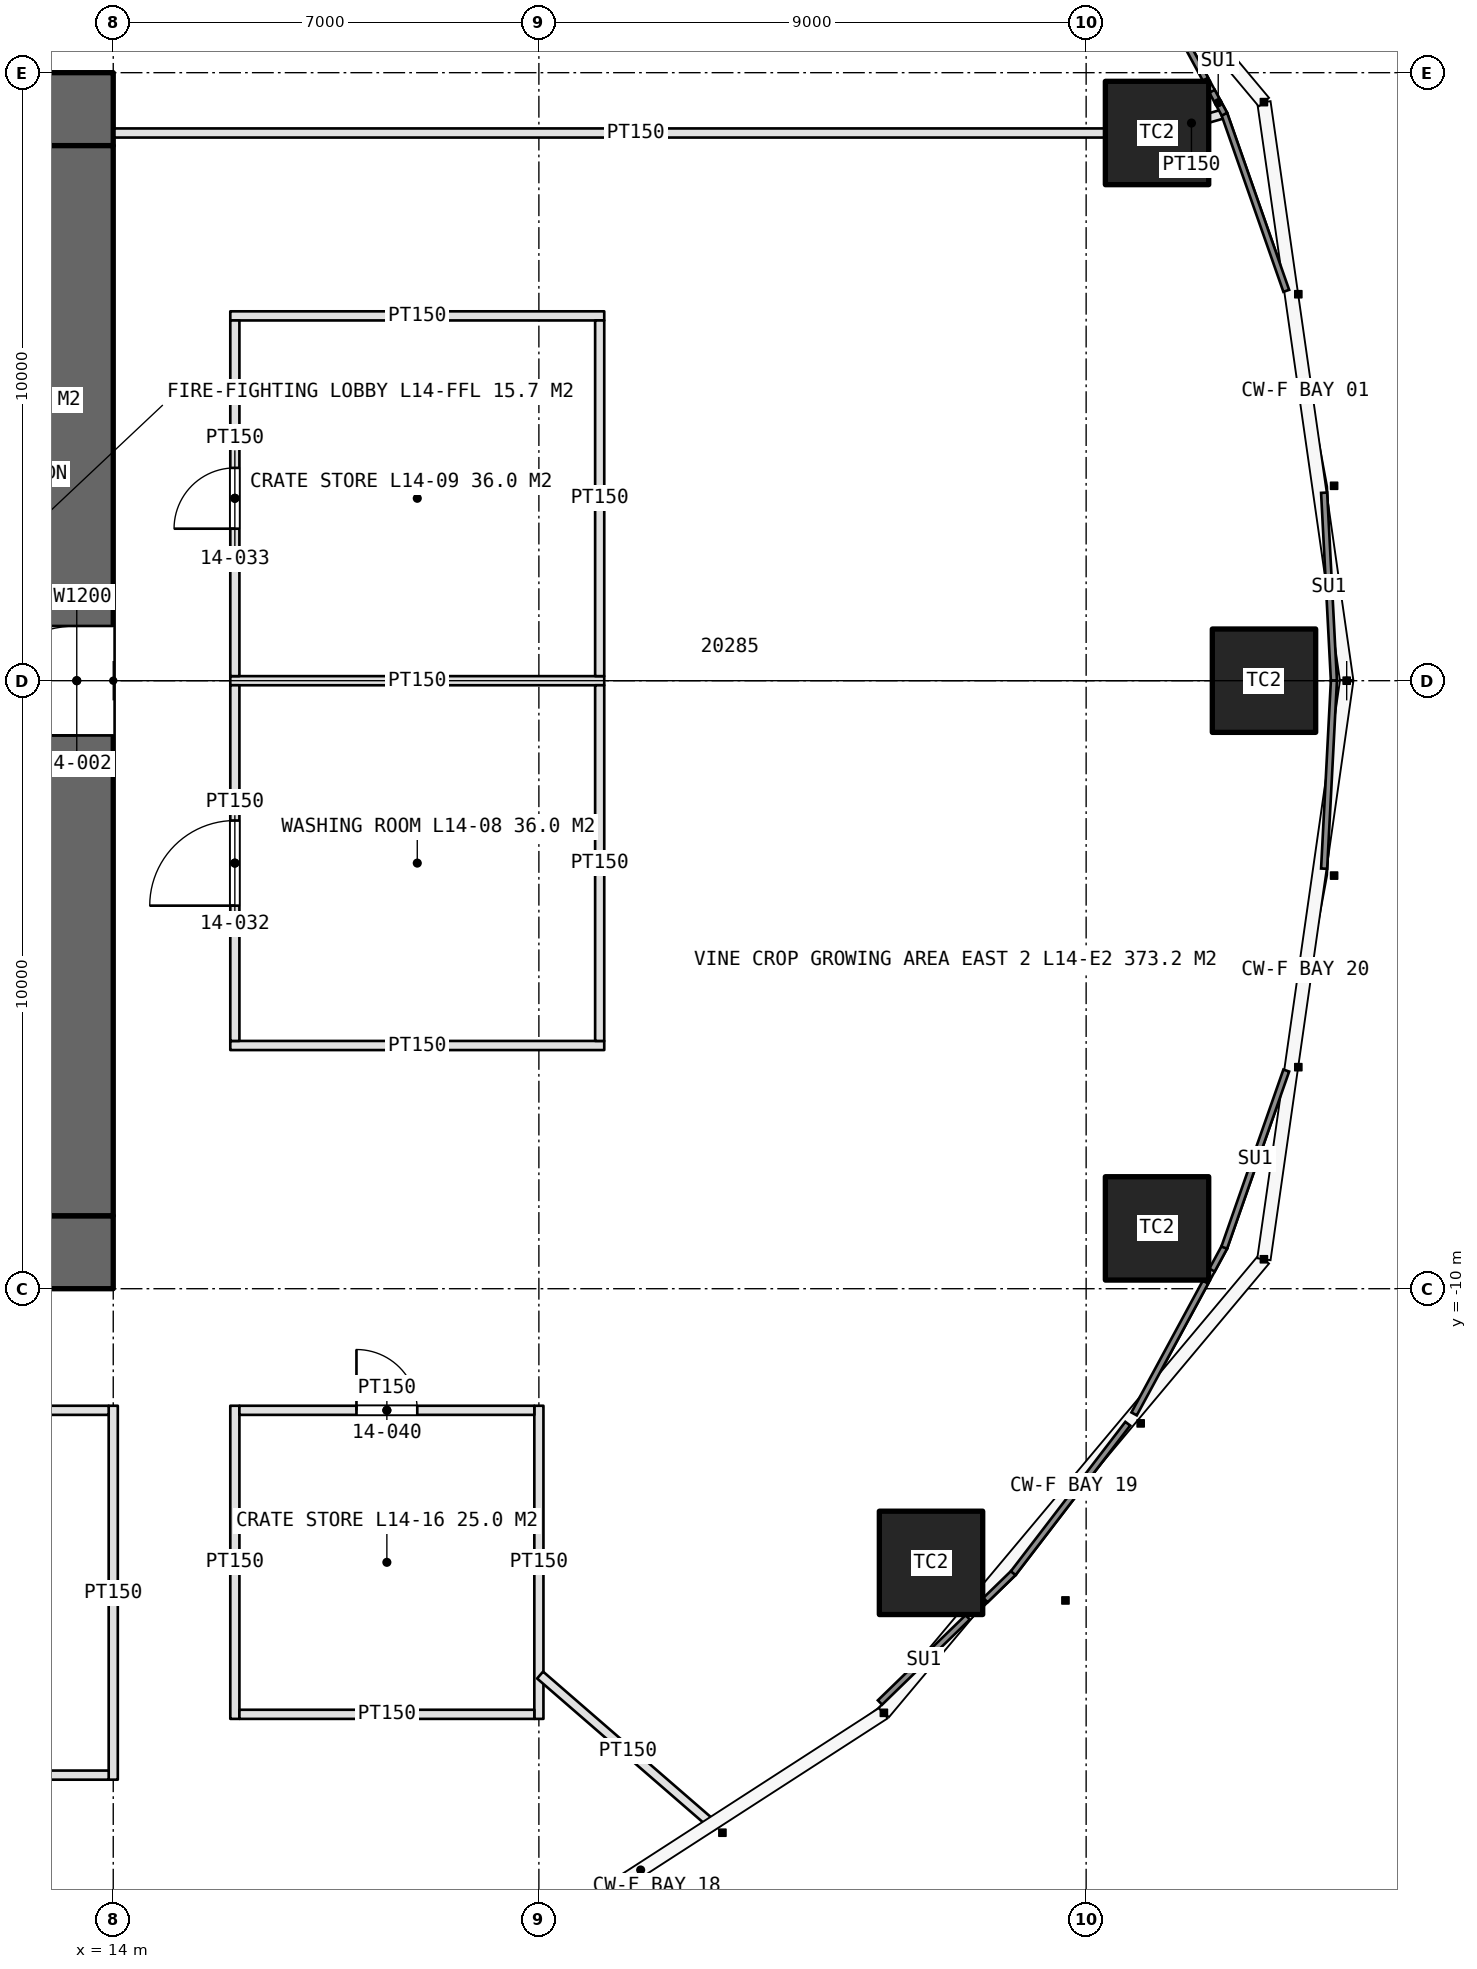
"""IFC4 building model, lengths in metres.
Left out: names, types, materials, properties, quantities, classifications, styles, units other than length and angle.
Written with IfcOpenShell. Run it as: python <this file> out.ifc"""

import sys

from ifc_helpers import new_model, si_unit, direction, frame, frame_2d, origin, origin_2d, place, context, subcontext, project, spatial, rectangle, extrude, element, fill, save


model = new_model("IFC4")
c1 = context("Model", 3, precision=1e-05, world=origin(), true_north=direction((0.0, 1.0)))
c2 = subcontext(c1, "Body", "Model", "MODEL_VIEW")
j1 = project(units=[si_unit("LENGTHUNIT", "METRE"), si_unit("PLANEANGLEUNIT", "RADIAN")], contexts=[c1])
p1 = place(None, origin())
s1 = spatial("IfcSite", under=j1, at=p1, CompositionType="ELEMENT")
p2 = place(p1, origin())
s2 = spatial("IfcBuilding", under=s1, at=p2, CompositionType="ELEMENT")
p3 = place(p2, frame((0.0, 0.0, 70.0)))
s3 = spatial("IfcBuildingStorey", under=s2, at=p3, CompositionType="ELEMENT", Elevation=70.0)
p4 = place(p3, frame((-14.0, -9.4, 0.0), z_axis=(0.0, 0.0, 1.0), x_axis=(1.0, 0.0, 0.0)))
e1 = element("IfcWall", 1, at=p4, inside=s3, PredefinedType="SHEAR", context=c2, shape_type="SweptSolid", body=[
    extrude(rectangle(XDim=28.0, YDim=1.2, at=frame_2d((14.0, 0.0))), origin(), (0.0, 0.0, 1.0), 5.0),
])
p5 = place(p4, frame((13.1, 0.0, 0.0)))
e2 = element("IfcOpeningElement", 2, at=p5, cuts=e1, PredefinedType="OPENING", context=c2, shape_type="SweptSolid", body=[
    extrude(rectangle(XDim=1.8, YDim=2.4, at=frame_2d((0.9, 1.2))), frame((0.0, 0.61, 0.0), z_axis=(0.0, -1.0, 0.0), x_axis=(1.0, 0.0, 0.0)), (0.0, 0.0, 1.0), 1.22),
])
p6 = place(p4, frame((22.9, 0.0, 0.0)))
e3 = element("IfcOpeningElement", 3, at=p6, cuts=e1, PredefinedType="OPENING", context=c2, shape_type="SweptSolid", body=[
    extrude(rectangle(XDim=2.2, YDim=2.7, at=frame_2d((1.1, 1.35))), frame((0.0, 0.61, 0.0), z_axis=(0.0, -1.0, 0.0), x_axis=(1.0, 0.0, 0.0)), (0.0, 0.0, 1.0), 1.22),
])
p7 = place(p3, frame((14.0, 9.4, 0.0), z_axis=(0.0, 0.0, 1.0), x_axis=(-1.0, 0.0, 0.0)))
e4 = element("IfcWall", 4, at=p7, inside=s3, PredefinedType="SHEAR", context=c2, shape_type="SweptSolid", body=[
    extrude(rectangle(XDim=28.0, YDim=1.2, at=frame_2d((14.0, 0.0))), origin(), (0.0, 0.0, 1.0), 5.0),
])
p8 = place(p7, frame((24.0, 0.0, 0.0)))
e5 = element("IfcOpeningElement", 5, at=p8, cuts=e4, PredefinedType="OPENING", context=c2, shape_type="SweptSolid", body=[
    extrude(rectangle(XDim=1.0, YDim=2.4, at=frame_2d((0.5, 1.2))), frame((0.0, 0.61, 0.0), z_axis=(0.0, -1.0, 0.0), x_axis=(1.0, 0.0, 0.0)), (0.0, 0.0, 1.0), 1.22),
])
p9 = place(p7, frame((13.1, 0.0, 0.0)))
e6 = element("IfcOpeningElement", 6, at=p9, cuts=e4, PredefinedType="OPENING", context=c2, shape_type="SweptSolid", body=[
    extrude(rectangle(XDim=1.8, YDim=2.4, at=frame_2d((0.9, 1.2))), frame((0.0, 0.61, 0.0), z_axis=(0.0, -1.0, 0.0), x_axis=(1.0, 0.0, 0.0)), (0.0, 0.0, 1.0), 1.22),
])
p10 = place(p3, frame((13.4, -8.8, 0.0), z_axis=(0.0, 0.0, 1.0), x_axis=(0.0, 1.0, 0.0)))
e7 = element("IfcWall", 7, at=p10, inside=s3, PredefinedType="SHEAR", context=c2, shape_type="SweptSolid", body=[
    extrude(rectangle(XDim=17.6, YDim=1.2, at=frame_2d((8.8, 0.0))), origin(), (0.0, 0.0, 1.0), 5.0),
])
p11 = place(p10, frame((7.9, 0.0, 0.0)))
e8 = element("IfcOpeningElement", 8, at=p11, cuts=e7, PredefinedType="OPENING", context=c2, shape_type="SweptSolid", body=[
    extrude(rectangle(XDim=1.8, YDim=2.4, at=frame_2d((0.9, 1.2))), frame((0.0, 0.61, 0.0), z_axis=(0.0, -1.0, 0.0), x_axis=(1.0, 0.0, 0.0)), (0.0, 0.0, 1.0), 1.22),
])
for number, where, z_axis, x_axis in (
    (9, (32.925, 0.0, 0.0), (0.0, 0.0, 1.0), (1.0, 0.0, 0.0)),
    (10, (31.166, 9.008, 0.0), (0.0, 0.0, 1.0), (1.0, 0.0, 0.0)),
    (11, (27.449, -14.509, 0.0), (0.0, 0.0, 1.0), (1.0, 0.0, 0.0)),
    (12, (31.166, -9.008, 0.0), (0.0, 0.0, 1.0), (1.0, 0.0, 0.0)),
):
    element("IfcColumn", number, at=place(p3, frame(where, z_axis=z_axis, x_axis=x_axis)), inside=s3, PredefinedType="COLUMN", context=c2, shape_type="SweptSolid", body=[
        extrude(rectangle(XDim=1.7, YDim=1.7, at=origin_2d()), origin(), (0.0, 0.0, 1.0), 5.0),
    ])
p12 = place(p3, frame((14.0, -11.925, 0.0), z_axis=(0.0, 0.0, 1.0), x_axis=(0.0, -1.0, 0.0)))
e13 = element("IfcWall", 13, at=p12, inside=s3, PredefinedType="PARTITIONING", context=c2, shape_type="SweptSolid", body=[
    extrude(rectangle(XDim=6.15, YDim=0.15, at=frame_2d((3.075, 0.0))), origin(), (0.0, 0.0, 1.0), 3.6),
])
p13 = place(p3, frame((5.075, -12.0, 0.0), z_axis=(0.0, 0.0, 1.0), x_axis=(1.0, 0.0, 0.0)))
e14 = element("IfcWall", 14, at=p13, inside=s3, PredefinedType="PARTITIONING", context=c2, shape_type="SweptSolid", body=[
    extrude(rectangle(XDim=8.85, YDim=0.15, at=frame_2d((4.425, 0.0))), origin(), (0.0, 0.0, 1.0), 3.6),
])
p14 = place(p13, frame((3.725, 0.0, 0.0)))
e15 = element("IfcOpeningElement", 15, at=p14, cuts=e14, PredefinedType="OPENING", context=c2, shape_type="SweptSolid", body=[
    extrude(rectangle(XDim=1.4, YDim=2.4, at=frame_2d((0.7, 1.2))), frame((0.0, 0.085, 0.0), z_axis=(0.0, -1.0, 0.0), x_axis=(1.0, 0.0, 0.0)), (0.0, 0.0, 1.0), 0.17),
])
p15 = place(p3, frame((5.075, -18.0, 0.0), z_axis=(0.0, 0.0, 1.0), x_axis=(1.0, 0.0, 0.0)))
e16 = element("IfcWall", 16, at=p15, inside=s3, PredefinedType="PARTITIONING", context=c2, shape_type="SweptSolid", body=[
    extrude(rectangle(XDim=8.85, YDim=0.15, at=frame_2d((4.425, 0.0))), origin(), (0.0, 0.0, 1.0), 3.6),
])
for number, where, z_axis, x_axis in (
    (17, (15.925, -6.0, 0.0), (0.0, 0.0, 1.0), (1.0, 0.0, 0.0)),
    (18, (15.925, 0.0, 0.0), (0.0, 0.0, 1.0), (1.0, 0.0, 0.0)),
    (19, (15.925, 6.0, 0.0), (0.0, 0.0, 1.0), (1.0, 0.0, 0.0)),
):
    element("IfcWall", number, at=place(p3, frame(where, z_axis=z_axis, x_axis=x_axis)), inside=s3, PredefinedType="PARTITIONING", context=c2, shape_type="SweptSolid", body=[
        extrude(rectangle(XDim=6.15, YDim=0.15, at=frame_2d((3.075, 0.0))), origin(), (0.0, 0.0, 1.0), 3.6),
    ])
p16 = place(p3, frame((16.0, -5.925, 0.0), z_axis=(0.0, 0.0, 1.0), x_axis=(0.0, 1.0, 0.0)))
e20 = element("IfcWall", 20, at=p16, inside=s3, PredefinedType="PARTITIONING", context=c2, shape_type="SweptSolid", body=[
    extrude(rectangle(XDim=5.85, YDim=0.15, at=frame_2d((2.925, 0.0))), origin(), (0.0, 0.0, 1.0), 3.6),
])
p17 = place(p16, frame((2.225, 0.0, 0.0)))
e21 = element("IfcOpeningElement", 21, at=p17, cuts=e20, PredefinedType="OPENING", context=c2, shape_type="SweptSolid", body=[
    extrude(rectangle(XDim=1.4, YDim=2.4, at=frame_2d((0.7, 1.2))), frame((0.0, 0.085, 0.0), z_axis=(0.0, -1.0, 0.0), x_axis=(1.0, 0.0, 0.0)), (0.0, 0.0, 1.0), 0.17),
])
p18 = place(p3, frame((22.0, -5.925, 0.0), z_axis=(0.0, 0.0, 1.0), x_axis=(0.0, 1.0, 0.0)))
e22 = element("IfcWall", 22, at=p18, inside=s3, PredefinedType="PARTITIONING", context=c2, shape_type="SweptSolid", body=[
    extrude(rectangle(XDim=5.85, YDim=0.15, at=frame_2d((2.925, 0.0))), origin(), (0.0, 0.0, 1.0), 3.6),
])
p19 = place(p3, frame((16.0, 0.075, 0.0), z_axis=(0.0, 0.0, 1.0), x_axis=(0.0, 1.0, 0.0)))
e23 = element("IfcWall", 23, at=p19, inside=s3, PredefinedType="PARTITIONING", context=c2, shape_type="SweptSolid", body=[
    extrude(rectangle(XDim=5.85, YDim=0.15, at=frame_2d((2.925, 0.0))), origin(), (0.0, 0.0, 1.0), 3.6),
])
p20 = place(p19, frame((2.425, 0.0, 0.0)))
e24 = element("IfcOpeningElement", 24, at=p20, cuts=e23, PredefinedType="OPENING", context=c2, shape_type="SweptSolid", body=[
    extrude(rectangle(XDim=1.0, YDim=2.2, at=frame_2d((0.5, 1.1))), frame((0.0, 0.085, 0.0), z_axis=(0.0, -1.0, 0.0), x_axis=(1.0, 0.0, 0.0)), (0.0, 0.0, 1.0), 0.17),
])
p21 = place(p3, frame((22.0, 0.075, 0.0), z_axis=(0.0, 0.0, 1.0), x_axis=(0.0, 1.0, 0.0)))
e25 = element("IfcWall", 25, at=p21, inside=s3, PredefinedType="PARTITIONING", context=c2, shape_type="SweptSolid", body=[
    extrude(rectangle(XDim=5.85, YDim=0.15, at=frame_2d((2.925, 0.0))), origin(), (0.0, 0.0, 1.0), 3.6),
])
for number, where, z_axis, x_axis in (
    (26, (16.0, -11.925, 0.0), (0.0, 0.0, 1.0), (0.0, -1.0, 0.0)),
    (27, (21.0, -11.925, 0.0), (0.0, 0.0, 1.0), (0.0, -1.0, 0.0)),
):
    element("IfcWall", number, at=place(p3, frame(where, z_axis=z_axis, x_axis=x_axis)), inside=s3, PredefinedType="PARTITIONING", context=c2, shape_type="SweptSolid", body=[
        extrude(rectangle(XDim=5.15, YDim=0.15, at=frame_2d((2.575, 0.0))), origin(), (0.0, 0.0, 1.0), 3.6),
    ])
p22 = place(p3, frame((16.075, -12.0, 0.0), z_axis=(0.0, 0.0, 1.0), x_axis=(1.0, 0.0, 0.0)))
e28 = element("IfcWall", 28, at=p22, inside=s3, PredefinedType="PARTITIONING", context=c2, shape_type="SweptSolid", body=[
    extrude(rectangle(XDim=4.85, YDim=0.15, at=frame_2d((2.425, 0.0))), origin(), (0.0, 0.0, 1.0), 3.6),
])
p23 = place(p22, frame((1.925, 0.0, 0.0)))
e29 = element("IfcOpeningElement", 29, at=p23, cuts=e28, PredefinedType="OPENING", context=c2, shape_type="SweptSolid", body=[
    extrude(rectangle(XDim=1.0, YDim=2.2, at=frame_2d((0.5, 1.1))), frame((0.0, 0.085, 0.0), z_axis=(0.0, -1.0, 0.0), x_axis=(1.0, 0.0, 0.0)), (0.0, 0.0, 1.0), 0.17),
])
p24 = place(p3, frame((16.075, -17.0, 0.0), z_axis=(0.0, 0.0, 1.0), x_axis=(1.0, 0.0, 0.0)))
e30 = element("IfcWall", 30, at=p24, inside=s3, PredefinedType="PARTITIONING", context=c2, shape_type="SweptSolid", body=[
    extrude(rectangle(XDim=4.85, YDim=0.15, at=frame_2d((2.425, 0.0))), origin(), (0.0, 0.0, 1.0), 3.6),
])
p25 = place(p3, frame((21.02, -16.354, 0.0), z_axis=(0.0, 0.0, 1.0), x_axis=(0.755425653008, -0.655234372402, 0.0)))
e31 = element("IfcWall", 31, at=p25, inside=s3, PredefinedType="PARTITIONING", context=c2, shape_type="SweptSolid", body=[
    extrude(rectangle(XDim=3.823, YDim=0.15, at=frame_2d((1.912, 0.0))), origin(), (0.0, 0.0, 1.0), 3.6),
])
p26 = place(p3, frame((14.02, 9.008, 0.0), z_axis=(0.0, 0.0, 1.0), x_axis=(1.0, 0.0, 0.0)))
e32 = element("IfcWall", 32, at=p26, inside=s3, PredefinedType="PARTITIONING", context=c2, shape_type="SweptSolid", body=[
    extrude(rectangle(XDim=17.146, YDim=0.15, at=frame_2d((8.573, 0.0))), origin(), (0.0, 0.0, 1.0), 3.6),
])
p27 = place(p3, frame((31.166, 9.008, 0.0), z_axis=(0.0, 0.0, 1.0), x_axis=(0.960777970385, 0.277318754547, 0.0)))
e33 = element("IfcWall", 33, at=p27, inside=s3, PredefinedType="PARTITIONING", context=c2, shape_type="SweptSolid", body=[
    extrude(rectangle(XDim=1.179, YDim=0.15, at=frame_2d((0.589, 0.0))), origin(), (0.0, 0.0, 1.0), 3.6),
])
p28 = place(p11, origin())
e34 = element("IfcDoor", 34, at=p28, inside=s3, OperationType="DOUBLE_DOOR_SINGLE_SWING", PredefinedType="DOOR", context=c2, shape_type="SweptSolid", body=[
    extrude(rectangle(XDim=1.8, YDim=2.4, at=frame_2d((0.9, 1.2))), frame((0.0, 0.025, 0.0), z_axis=(0.0, -1.0, 0.0), x_axis=(1.0, 0.0, 0.0)), (0.0, 0.0, 1.0), 0.05),
])
fill(e8, e34)
p29 = place(p17, origin())
e35 = element("IfcDoor", 35, at=p29, inside=s3, OperationType="DOUBLE_DOOR_DOUBLE_SWING", PredefinedType="DOOR", context=c2, shape_type="SweptSolid", body=[
    extrude(rectangle(XDim=1.4, YDim=2.4, at=frame_2d((0.7, 1.2))), frame((0.0, 0.025, 0.0), z_axis=(0.0, -1.0, 0.0), x_axis=(1.0, 0.0, 0.0)), (0.0, 0.0, 1.0), 0.05),
])
fill(e21, e35)
p30 = place(p20, origin())
e36 = element("IfcDoor", 36, at=p30, inside=s3, OperationType="SINGLE_SWING_LEFT", PredefinedType="DOOR", context=c2, shape_type="SweptSolid", body=[
    extrude(rectangle(XDim=1.0, YDim=2.2, at=frame_2d((0.5, 1.1))), frame((0.0, 0.025, 0.0), z_axis=(0.0, -1.0, 0.0), x_axis=(1.0, 0.0, 0.0)), (0.0, 0.0, 1.0), 0.05),
])
fill(e24, e36)
p31 = place(p23, origin())
e37 = element("IfcDoor", 37, at=p31, inside=s3, OperationType="SINGLE_SWING_LEFT", PredefinedType="DOOR", context=c2, shape_type="SweptSolid", body=[
    extrude(rectangle(XDim=1.0, YDim=2.2, at=frame_2d((0.5, 1.1))), frame((0.0, 0.025, 0.0), z_axis=(0.0, -1.0, 0.0), x_axis=(1.0, 0.0, 0.0)), (0.0, 0.0, 1.0), 0.05),
])
fill(e29, e37)
save(model, sys.argv[1])
